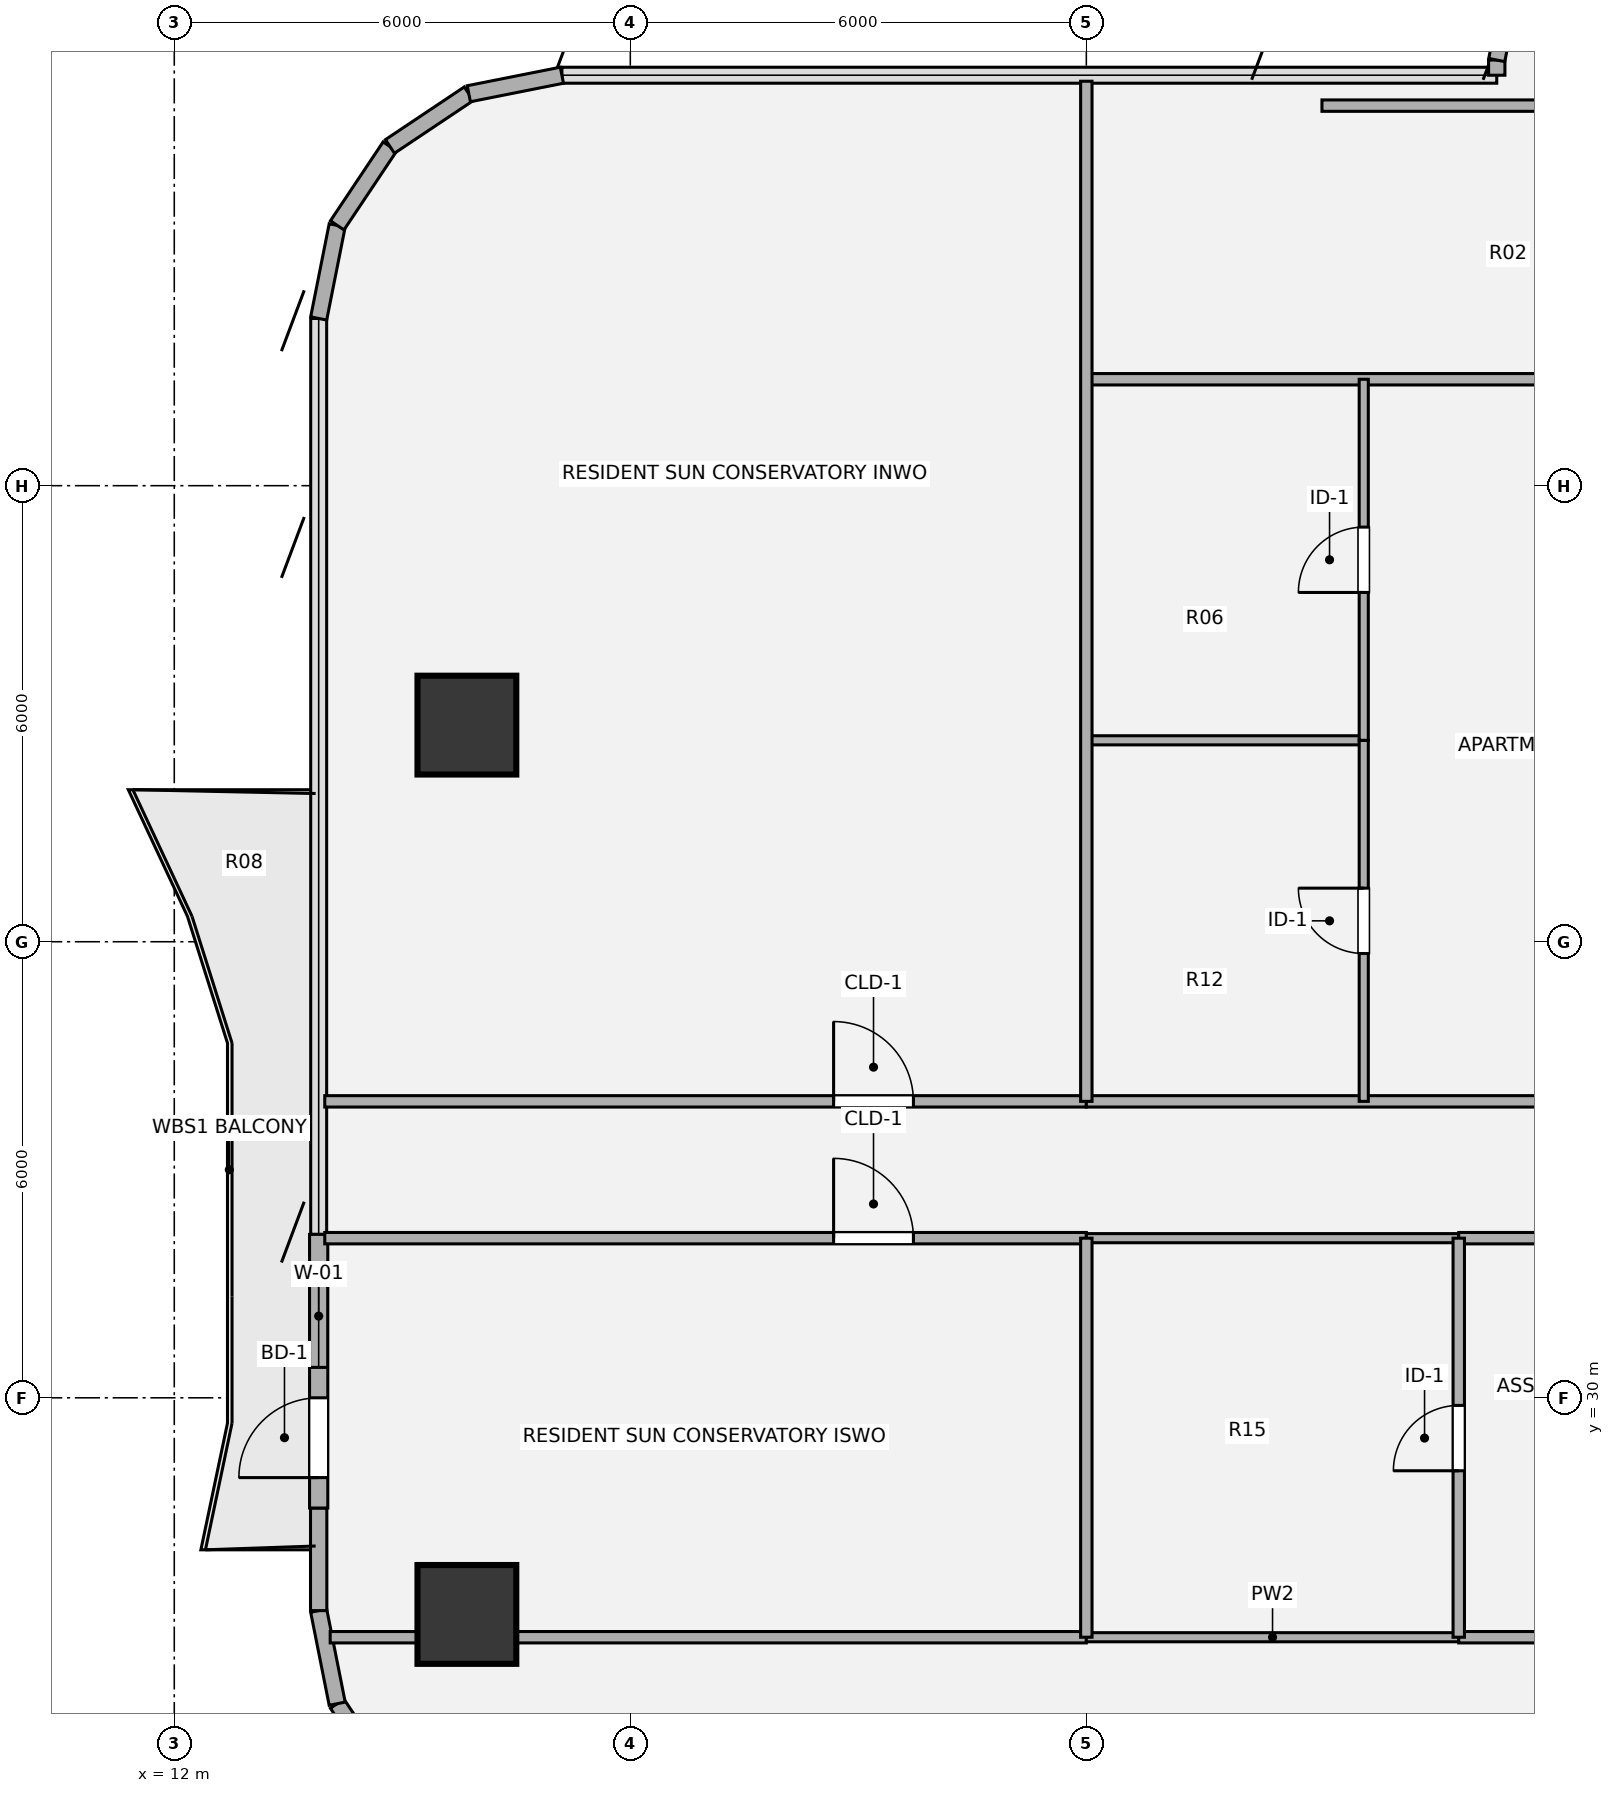
"""IFC4 building model, lengths in metres.
Left out: names, types, materials, properties, quantities, classifications, styles, units other than length and angle.
Written with IfcOpenShell. Run it as: python <this file> out.ifc"""

import sys

from ifc_helpers import new_model, si_unit, direction, frame, frame_2d, origin, origin_2d, place, context, subcontext, project, spatial, rectangle, hollow_circle, extrude, source, transform, mapped, element, fill, save


model = new_model("IFC4")
c1 = context("Model", 3, precision=1e-05, world=origin(), true_north=direction((0.0, 1.0)))
c2 = subcontext(c1, "Body", "Model", "MODEL_VIEW")
j1 = project(units=[si_unit("LENGTHUNIT", "METRE"), si_unit("PLANEANGLEUNIT", "RADIAN")], contexts=[c1])
p1 = place(None, origin())
s1 = spatial("IfcSite", under=j1, at=p1, CompositionType="ELEMENT")
p2 = place(p1, origin())
s2 = spatial("IfcBuilding", under=s1, at=p2, CompositionType="ELEMENT")
p3 = place(p2, frame((0.0, 0.0, 89.82)))
s3 = spatial("IfcBuildingStorey", under=s2, at=p3, CompositionType="ELEMENT", Elevation=89.82)
m1 = source(origin(), c2, "Body", "SweptSolid", [
    extrude(hollow_circle(Radius=0.65, WallThickness=0.045, at=origin_2d()), origin(), (0.0, 0.0, 1.0), 3.78),
])
for number, where, z_axis, x_axis in (
    (1, (15.85, 27.15, 0.0), (0.0, 0.0, 1.0), (1.0, 0.0, 0.0)),
    (2, (15.85, 38.85, 0.0), (0.0, 0.0, 1.0), (1.0, 0.0, 0.0)),
):
    element("IfcColumn", number, at=place(p3, frame(where, z_axis=z_axis, x_axis=x_axis)), inside=s3, PredefinedType="COLUMN", context=c2, shape_type="MappedRepresentation", body=[
        mapped(m1, transform((0.0, 0.0, 0.0), x_axis=(1.0, 0.0, 0.0), y_axis=(0.0, 1.0, 0.0), z_axis=(0.0, 0.0, 1.0), scale=1.0)),
    ])
for number, where, z_axis, x_axis in (
    (3, (14.837, 24.937, 0.0), (0.0, 0.0, 1.0), (-0.556, 0.831, 0.0)),
    (4, (14.144, 25.975, 0.0), (0.0, 0.0, 1.0), (-0.195, 0.981, 0.0)),
):
    element("IfcWall", number, at=place(p3, frame(where, z_axis=z_axis, x_axis=x_axis)), inside=s3, PredefinedType="SOLIDWALL", context=c2, shape_type="SweptSolid", body=[
        extrude(rectangle(XDim=1.249, YDim=0.215, at=frame_2d((0.624, 0.0))), origin(), (0.0, 0.0, 1.0), 3.53),
    ])
p4 = place(p3, frame((13.9, 27.2, 0.0), z_axis=(0.0, 0.0, 1.0), x_axis=(0.0, 1.0, 0.0)))
e5 = element("IfcWall", 5, at=p4, inside=s3, PredefinedType="SOLIDWALL", context=c2, shape_type="SweptSolid", body=[
    extrude(rectangle(XDim=1.35, YDim=0.215, at=frame_2d((0.675, 0.0))), origin(), (0.0, 0.0, 1.0), 3.53),
])
p5 = place(p3, frame((13.9, 28.55, 0.0), z_axis=(0.0, 0.0, 1.0), x_axis=(0.0, 1.0, 0.0)))
e6 = element("IfcWall", 6, at=p5, inside=s3, PredefinedType="SOLIDWALL", context=c2, shape_type="SweptSolid", body=[
    extrude(rectangle(XDim=3.6, YDim=0.24, at=frame_2d((1.8, 0.0))), origin(), (0.0, 0.0, 1.0), 3.53),
])
p6 = place(p5, frame((0.4, 0.0, 0.0)))
e7 = element("IfcOpeningElement", 7, at=p6, cuts=e6, PredefinedType="OPENING", context=c2, shape_type="SweptSolid", body=[
    extrude(rectangle(XDim=1.05, YDim=2.15, at=origin_2d()), frame((0.525, 0.13, 1.075), z_axis=(0.0, -1.0, 0.0), x_axis=(1.0, 0.0, 0.0)), (0.0, 0.0, 1.0), 0.26),
])
p7 = place(p5, frame((1.85, 0.0, 0.85)))
e8 = element("IfcOpeningElement", 8, at=p7, cuts=e6, PredefinedType="OPENING", context=c2, shape_type="SweptSolid", body=[
    extrude(rectangle(XDim=1.35, YDim=1.35, at=origin_2d()), frame((0.675, 0.13, 0.675), z_axis=(0.0, -1.0, 0.0), x_axis=(1.0, 0.0, 0.0)), (0.0, 0.0, 1.0), 0.26),
])
for number, where, z_axis, x_axis in (
    (9, (13.9, 44.2, 0.0), (0.0, 0.0, 1.0), (0.195, 0.981, 0.0)),
    (10, (14.144, 45.425, 0.0), (0.0, 0.0, 1.0), (0.556, 0.831, 0.0)),
    (11, (14.837, 46.463, 0.0), (0.0, 0.0, 1.0), (0.831, 0.556, 0.0)),
    (12, (15.875, 47.156, 0.0), (0.0, 0.0, 1.0), (0.981, 0.195, 0.0)),
):
    element("IfcWall", number, at=place(p3, frame(where, z_axis=z_axis, x_axis=x_axis)), inside=s3, PredefinedType="SOLIDWALL", context=c2, shape_type="SweptSolid", body=[
        extrude(rectangle(XDim=1.249, YDim=0.215, at=frame_2d((0.624, 0.0))), origin(), (0.0, 0.0, 1.0), 3.53),
    ])
p8 = place(p3, frame((29.4, 47.4, 0.0), z_axis=(0.0, 0.0, 1.0), x_axis=(0.0, 1.0, 0.0)))
e13 = element("IfcWall", 13, at=p8, inside=s3, PredefinedType="SOLIDWALL", context=c2, shape_type="SweptSolid", body=[
    extrude(rectangle(XDim=0.2, YDim=0.215, at=frame_2d((0.1, 0.0))), origin(), (0.0, 0.0, 1.0), 3.53),
])
p9 = place(p3, frame((29.4, 47.6, 0.0), z_axis=(0.0, 0.0, 1.0), x_axis=(0.195127417394, 0.980777900945, 0.0)))
e14 = element("IfcWall", 14, at=p9, inside=s3, PredefinedType="SOLIDWALL", context=c2, shape_type="SweptSolid", body=[
    extrude(rectangle(XDim=1.092, YDim=0.215, at=frame_2d((0.546, 0.0))), origin(), (0.0, 0.0, 1.0), 3.53),
])
p10 = place(p3, frame((14.051, 26.85, 0.0), z_axis=(0.0, 0.0, 1.0), x_axis=(1.0, 0.0, 0.0)))
e15 = element("IfcWall", 15, at=p10, inside=s3, PredefinedType="PARTITIONING", context=c2, shape_type="SweptSolid", body=[
    extrude(rectangle(XDim=9.949, YDim=0.15, at=frame_2d((4.974, 0.0))), origin(), (0.0, 0.0, 1.0), 3.055),
])
p11 = place(p3, frame((24.0, 26.85, 0.0), z_axis=(0.0, 0.0, 1.0), x_axis=(1.0, 0.0, 0.0)))
e16 = element("IfcWall", 16, at=p11, inside=s3, PredefinedType="PARTITIONING", context=c2, shape_type="SweptSolid", body=[
    extrude(rectangle(XDim=4.9, YDim=0.12, at=frame_2d((2.45, 0.0))), origin(), (0.0, 0.0, 1.0), 3.055),
])
p12 = place(p3, frame((28.9, 26.85, 0.0), z_axis=(0.0, 0.0, 1.0), x_axis=(1.0, 0.0, 0.0)))
e17 = element("IfcWall", 17, at=p12, inside=s3, PredefinedType="PARTITIONING", context=c2, shape_type="SweptSolid", body=[
    extrude(rectangle(XDim=6.2, YDim=0.15, at=frame_2d((3.1, 0.0))), origin(), (0.0, 0.0, 1.0), 2.903),
])
p13 = place(p3, frame((13.98, 32.1, 0.0), z_axis=(0.0, 0.0, 1.0), x_axis=(1.0, 0.0, 0.0)))
e18 = element("IfcWall", 18, at=p13, inside=s3, PredefinedType="PARTITIONING", context=c2, shape_type="SweptSolid", body=[
    extrude(rectangle(XDim=10.02, YDim=0.15, at=frame_2d((5.01, 0.0))), origin(), (0.0, 0.0, 1.0), 2.982),
])
p14 = place(p13, frame((6.695, 0.0, 0.0)))
e19 = element("IfcOpeningElement", 19, at=p14, cuts=e18, PredefinedType="OPENING", context=c2, shape_type="SweptSolid", body=[
    extrude(rectangle(XDim=1.05, YDim=2.1, at=origin_2d()), frame((0.525, 0.085, 1.05), z_axis=(0.0, -1.0, 0.0), x_axis=(1.0, 0.0, 0.0)), (0.0, 0.0, 1.0), 0.17),
])
p15 = place(p3, frame((24.0, 32.1, 0.0), z_axis=(0.0, 0.0, 1.0), x_axis=(1.0, 0.0, 0.0)))
e20 = element("IfcWall", 20, at=p15, inside=s3, PredefinedType="PARTITIONING", context=c2, shape_type="SweptSolid", body=[
    extrude(rectangle(XDim=4.9, YDim=0.12, at=frame_2d((2.45, 0.0))), origin(), (0.0, 0.0, 1.0), 2.982),
])
p16 = place(p3, frame((28.9, 32.1, 0.0), z_axis=(0.0, 0.0, 1.0), x_axis=(1.0, 0.0, 0.0)))
e21 = element("IfcWall", 21, at=p16, inside=s3, PredefinedType="PARTITIONING", context=c2, shape_type="SweptSolid", body=[
    extrude(rectangle(XDim=6.2, YDim=0.15, at=frame_2d((3.1, 0.0))), origin(), (0.0, 0.0, 1.0), 2.982),
])
p17 = place(p3, frame((13.98, 33.9, 0.0), z_axis=(0.0, 0.0, 1.0), x_axis=(1.0, 0.0, 0.0)))
e22 = element("IfcWall", 22, at=p17, inside=s3, PredefinedType="PARTITIONING", context=c2, shape_type="SweptSolid", body=[
    extrude(rectangle(XDim=10.02, YDim=0.15, at=frame_2d((5.01, 0.0))), origin(), (0.0, 0.0, 1.0), 2.982),
])
p18 = place(p17, frame((6.695, 0.0, 0.0)))
e23 = element("IfcOpeningElement", 23, at=p18, cuts=e22, PredefinedType="OPENING", context=c2, shape_type="SweptSolid", body=[
    extrude(rectangle(XDim=1.05, YDim=2.1, at=origin_2d()), frame((0.525, 0.085, 1.05), z_axis=(0.0, -1.0, 0.0), x_axis=(1.0, 0.0, 0.0)), (0.0, 0.0, 1.0), 0.17),
])
p19 = place(p3, frame((24.0, 33.9, 0.0), z_axis=(0.0, 0.0, 1.0), x_axis=(1.0, 0.0, 0.0)))
e24 = element("IfcWall", 24, at=p19, inside=s3, PredefinedType="PARTITIONING", context=c2, shape_type="SweptSolid", body=[
    extrude(rectangle(XDim=11.1, YDim=0.15, at=frame_2d((5.55, 0.0))), origin(), (0.0, 0.0, 1.0), 2.982),
])
p20 = place(p3, frame((24.0, 38.65, 0.0), z_axis=(0.0, 0.0, 1.0), x_axis=(1.0, 0.0, 0.0)))
e25 = element("IfcWall", 25, at=p20, inside=s3, PredefinedType="PARTITIONING", context=c2, shape_type="SweptSolid", body=[
    extrude(rectangle(XDim=3.65, YDim=0.12, at=frame_2d((1.825, 0.0))), origin(), (0.0, 0.0, 1.0), 2.903),
])
p21 = place(p3, frame((24.0, 43.4, 0.0), z_axis=(0.0, 0.0, 1.0), x_axis=(1.0, 0.0, 0.0)))
e26 = element("IfcWall", 26, at=p21, inside=s3, PredefinedType="PARTITIONING", context=c2, shape_type="SweptSolid", body=[
    extrude(rectangle(XDim=11.1, YDim=0.15, at=frame_2d((5.55, 0.0))), origin(), (0.0, 0.0, 1.0), 3.308),
])
p22 = place(p3, frame((27.1, 47.0, 0.0), z_axis=(0.0, 0.0, 1.0), x_axis=(1.0, 0.0, 0.0)))
e27 = element("IfcWall", 27, at=p22, inside=s3, PredefinedType="PARTITIONING", context=c2, shape_type="SweptSolid", body=[
    extrude(rectangle(XDim=17.8, YDim=0.15, at=frame_2d((8.9, 0.0))), origin(), (0.0, 0.0, 1.0), 3.308),
])
p23 = place(p22, frame((8.375, 0.0, 0.0)))
e28 = element("IfcOpeningElement", 28, at=p23, cuts=e27, PredefinedType="OPENING", context=c2, shape_type="SweptSolid", body=[
    extrude(rectangle(XDim=1.05, YDim=2.1, at=origin_2d()), frame((0.525, 0.085, 1.05), z_axis=(0.0, -1.0, 0.0), x_axis=(1.0, 0.0, 0.0)), (0.0, 0.0, 1.0), 0.17),
])
p24 = place(p3, frame((24.0, 26.85, 0.0), z_axis=(0.0, 0.0, 1.0), x_axis=(0.0, 1.0, 0.0)))
e29 = element("IfcWall", 29, at=p24, inside=s3, PredefinedType="PARTITIONING", context=c2, shape_type="SweptSolid", body=[
    extrude(rectangle(XDim=5.25, YDim=0.15, at=frame_2d((2.625, 0.0))), origin(), (0.0, 0.0, 1.0), 3.5),
])
p25 = place(p3, frame((24.0, 33.9, 0.0), z_axis=(0.0, 0.0, 1.0), x_axis=(0.0, 1.0, 0.0)))
e30 = element("IfcWall", 30, at=p25, inside=s3, PredefinedType="PARTITIONING", context=c2, shape_type="SweptSolid", body=[
    extrude(rectangle(XDim=13.421, YDim=0.15, at=frame_2d((6.71, 0.0))), origin(), (0.0, 0.0, 1.0), 3.5),
])
p26 = place(p3, frame((27.65, 33.9, 0.0), z_axis=(0.0, 0.0, 1.0), x_axis=(0.0, 1.0, 0.0)))
e31 = element("IfcWall", 31, at=p26, inside=s3, PredefinedType="PARTITIONING", context=c2, shape_type="SweptSolid", body=[
    extrude(rectangle(XDim=4.75, YDim=0.12, at=frame_2d((2.375, 0.0))), origin(), (0.0, 0.0, 1.0), 3.5),
])
p27 = place(p26, frame((1.945, 0.0, 0.0)))
e32 = element("IfcOpeningElement", 32, at=p27, cuts=e31, PredefinedType="OPENING", context=c2, shape_type="SweptSolid", body=[
    extrude(rectangle(XDim=0.86, YDim=2.1, at=origin_2d()), frame((0.43, 0.07, 1.05), z_axis=(0.0, -1.0, 0.0), x_axis=(1.0, 0.0, 0.0)), (0.0, 0.0, 1.0), 0.14),
])
p28 = place(p3, frame((27.65, 38.65, 0.0), z_axis=(0.0, 0.0, 1.0), x_axis=(0.0, 1.0, 0.0)))
e33 = element("IfcWall", 33, at=p28, inside=s3, PredefinedType="PARTITIONING", context=c2, shape_type="SweptSolid", body=[
    extrude(rectangle(XDim=4.75, YDim=0.12, at=frame_2d((2.375, 0.0))), origin(), (0.0, 0.0, 1.0), 3.5),
])
p29 = place(p28, frame((1.945, 0.0, 0.0)))
e34 = element("IfcOpeningElement", 34, at=p29, cuts=e33, PredefinedType="OPENING", context=c2, shape_type="SweptSolid", body=[
    extrude(rectangle(XDim=0.86, YDim=2.1, at=origin_2d()), frame((0.43, 0.07, 1.05), z_axis=(0.0, -1.0, 0.0), x_axis=(1.0, 0.0, 0.0)), (0.0, 0.0, 1.0), 0.14),
])
p30 = place(p3, frame((28.9, 26.85, 0.0), z_axis=(0.0, 0.0, 1.0), x_axis=(0.0, 1.0, 0.0)))
e35 = element("IfcWall", 35, at=p30, inside=s3, PredefinedType="PARTITIONING", context=c2, shape_type="SweptSolid", body=[
    extrude(rectangle(XDim=5.25, YDim=0.15, at=frame_2d((2.625, 0.0))), origin(), (0.0, 0.0, 1.0), 3.5),
])
p31 = place(p30, frame((2.19, 0.0, 0.0)))
e36 = element("IfcOpeningElement", 36, at=p31, cuts=e35, PredefinedType="OPENING", context=c2, shape_type="SweptSolid", body=[
    extrude(rectangle(XDim=0.86, YDim=2.1, at=origin_2d()), frame((0.43, 0.085, 1.05), z_axis=(0.0, -1.0, 0.0), x_axis=(1.0, 0.0, 0.0)), (0.0, 0.0, 1.0), 0.17),
])
m2 = source(origin(), c2, "Body", "SweptSolid", [
    extrude(rectangle(XDim=1.05, YDim=2.15, at=origin_2d()), frame((0.525, 0.025, 1.075), z_axis=(0.0, -1.0, 0.0), x_axis=(1.0, 0.0, 0.0)), (0.0, 0.0, 1.0), 0.05),
])
p32 = place(p6, origin())
e37 = element("IfcDoor", 37, at=p32, inside=s3, OperationType="SINGLE_SWING_LEFT", PredefinedType="DOOR", context=c2, shape_type="MappedRepresentation", body=[
    mapped(m2, transform((0.0, 0.0, 0.0), x_axis=(1.0, 0.0, 0.0), y_axis=(0.0, 1.0, 0.0), z_axis=(0.0, 0.0, 1.0), scale=1.0)),
])
fill(e7, e37)
m3 = source(origin(), c2, "Body", "SweptSolid", [
    extrude(rectangle(XDim=1.35, YDim=1.35, at=origin_2d()), frame((0.675, 0.03, 0.675), z_axis=(0.0, -1.0, 0.0), x_axis=(1.0, 0.0, 0.0)), (0.0, 0.0, 1.0), 0.06),
])
p33 = place(p7, origin())
e38 = element("IfcWindow", 38, at=p33, inside=s3, PartitioningType="SINGLE_PANEL", PredefinedType="WINDOW", context=c2, shape_type="MappedRepresentation", body=[
    mapped(m3, transform((0.0, 0.0, 0.0), x_axis=(1.0, 0.0, 0.0), y_axis=(0.0, 1.0, 0.0), z_axis=(0.0, 0.0, 1.0), scale=1.0)),
])
fill(e8, e38)
m4 = source(origin(), c2, "Body", "SweptSolid", [
    extrude(rectangle(XDim=1.05, YDim=2.1, at=origin_2d()), frame((0.525, 0.025, 1.05), z_axis=(0.0, -1.0, 0.0), x_axis=(1.0, 0.0, 0.0)), (0.0, 0.0, 1.0), 0.05),
])
p34 = place(p14, origin())
e39 = element("IfcDoor", 39, at=p34, inside=s3, OperationType="SINGLE_SWING_LEFT", PredefinedType="DOOR", context=c2, shape_type="MappedRepresentation", body=[
    mapped(m4, transform((0.0, 0.0, 0.0), x_axis=(1.0, 0.0, 0.0), y_axis=(0.0, 1.0, 0.0), z_axis=(0.0, 0.0, 1.0), scale=1.0)),
])
fill(e19, e39)
p35 = place(p18, origin())
e40 = element("IfcDoor", 40, at=p35, inside=s3, OperationType="SINGLE_SWING_LEFT", PredefinedType="DOOR", context=c2, shape_type="MappedRepresentation", body=[
    mapped(m4, transform((0.0, 0.0, 0.0), x_axis=(1.0, 0.0, 0.0), y_axis=(0.0, 1.0, 0.0), z_axis=(0.0, 0.0, 1.0), scale=1.0)),
])
fill(e23, e40)
m5 = source(origin(), c2, "Body", "SweptSolid", [
    extrude(rectangle(XDim=0.86, YDim=2.1, at=origin_2d()), frame((0.43, 0.025, 1.05), z_axis=(0.0, -1.0, 0.0), x_axis=(1.0, 0.0, 0.0)), (0.0, 0.0, 1.0), 0.05),
])
p36 = place(p27, origin())
e41 = element("IfcDoor", 41, at=p36, inside=s3, OperationType="SINGLE_SWING_RIGHT", PredefinedType="DOOR", context=c2, shape_type="MappedRepresentation", body=[
    mapped(m5, transform((0.0, 0.0, 0.0), x_axis=(1.0, 0.0, 0.0), y_axis=(0.0, 1.0, 0.0), z_axis=(0.0, 0.0, 1.0), scale=1.0)),
])
fill(e32, e41)
p37 = place(p29, origin())
e42 = element("IfcDoor", 42, at=p37, inside=s3, OperationType="SINGLE_SWING_LEFT", PredefinedType="DOOR", context=c2, shape_type="MappedRepresentation", body=[
    mapped(m5, transform((0.0, 0.0, 0.0), x_axis=(1.0, 0.0, 0.0), y_axis=(0.0, 1.0, 0.0), z_axis=(0.0, 0.0, 1.0), scale=1.0)),
])
fill(e34, e42)
p38 = place(p31, origin())
e43 = element("IfcDoor", 43, at=p38, inside=s3, OperationType="SINGLE_SWING_LEFT", PredefinedType="DOOR", context=c2, shape_type="MappedRepresentation", body=[
    mapped(m5, transform((0.0, 0.0, 0.0), x_axis=(1.0, 0.0, 0.0), y_axis=(0.0, 1.0, 0.0), z_axis=(0.0, 0.0, 1.0), scale=1.0)),
])
fill(e36, e43)
save(model, sys.argv[1])
